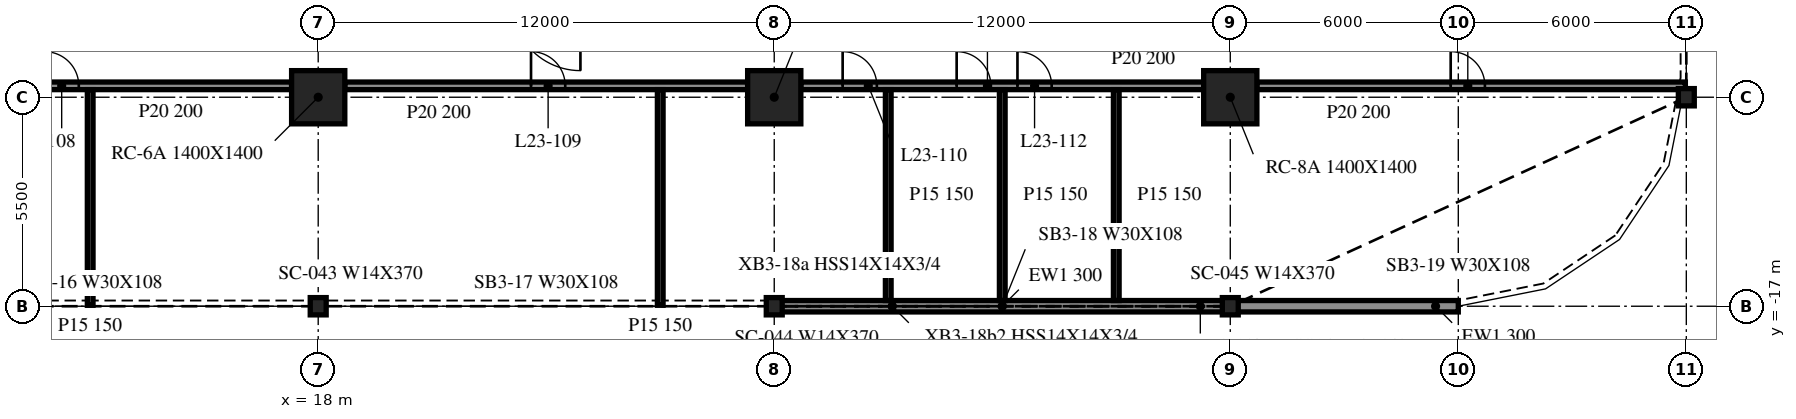
"""IFC4 building model, lengths in metres.
Left out: names, types, materials, properties, quantities, classifications, styles, units other than length and angle.
Written with IfcOpenShell. Run it as: python <this file> out.ifc"""

import sys

from ifc_helpers import new_model, si_unit, direction, frame, frame_2d, origin, origin_2d, place, context, subcontext, project, spatial, rectangle, i_section, extrude, element, fill, save


model = new_model("IFC4")
c1 = context("Model", 3, precision=1e-05, world=origin(), true_north=direction((0.0, 1.0)))
c2 = subcontext(c1, "Body", "Model", "MODEL_VIEW")
j1 = project(units=[si_unit("LENGTHUNIT", "METRE"), si_unit("PLANEANGLEUNIT", "RADIAN")], contexts=[c1])
p1 = place(None, origin())
s1 = spatial("IfcSite", under=j1, at=p1, CompositionType="ELEMENT")
p2 = place(p1, origin())
s2 = spatial("IfcBuilding", under=s1, at=p2, CompositionType="ELEMENT")
p3 = place(p2, frame((0.0, 0.0, 101.2)))
s3 = spatial("IfcBuildingStorey", under=s2, at=p3, CompositionType="ELEMENT", Elevation=101.2)
for number, where, z_axis, x_axis in (
    (1, (18.0, -11.5, -0.34), (0.0, 0.0, 1.0), (1.0, 0.0, 0.0)),
    (2, (30.0, -11.5, -0.34), (0.0, 0.0, 1.0), (1.0, 0.0, 0.0)),
    (3, (42.0, -11.5, -0.34), (0.0, 0.0, 1.0), (1.0, 0.0, 0.0)),
):
    element("IfcColumn", number, at=place(p3, frame(where, z_axis=z_axis, x_axis=x_axis)), inside=s3, PredefinedType="COLUMN", context=c2, shape_type="SweptSolid", body=[
        extrude(rectangle(XDim=1.4, YDim=1.4, at=origin_2d()), origin(), (0.0, 0.0, 1.0), 4.1),
    ])
for number, where, z_axis, x_axis in (
    (4, (18.0, -17.0, -0.34), (0.0, 0.0, 1.0), (1.0, 0.0, 0.0)),
    (5, (30.0, -17.0, -0.34), (0.0, 0.0, 1.0), (1.0, 0.0, 0.0)),
    (6, (42.0, -17.0, -0.34), (0.0, 0.0, 1.0), (1.0, 0.0, 0.0)),
    (7, (54.0, -11.5, -0.34), (0.0, 0.0, 1.0), (1.0, 0.0, 0.0)),
):
    element("IfcColumn", number, at=place(p3, frame(where, z_axis=z_axis, x_axis=x_axis)), inside=s3, PredefinedType="COLUMN", context=c2, shape_type="SweptSolid", body=[
        extrude(i_section(OverallWidth=0.419, OverallDepth=0.455, WebThickness=0.042, FlangeThickness=0.068, at=origin_2d()), origin(), (0.0, 0.0, 1.0), 4.1),
    ])
p4 = place(p3, frame((30.021, -17.0, 0.0), z_axis=(0.0, 0.0, 1.0), x_axis=(1.0, 0.0, 0.0)))
e8 = element("IfcWall", 8, at=p4, inside=s3, PredefinedType="NOTDEFINED", context=c2, shape_type="SweptSolid", body=[
    extrude(rectangle(XDim=11.958, YDim=0.3, at=frame_2d((5.979, 0.0))), origin(), (0.0, 0.0, 1.0), 3.003),
])
p5 = place(p3, frame((42.021, -17.0, 0.0), z_axis=(0.0, 0.0, 1.0), x_axis=(1.0, 0.0, 0.0)))
e9 = element("IfcWall", 9, at=p5, inside=s3, PredefinedType="NOTDEFINED", context=c2, shape_type="SweptSolid", body=[
    extrude(rectangle(XDim=5.979, YDim=0.3, at=frame_2d((2.99, 0.0))), origin(), (0.0, 0.0, 1.0), 3.003),
])
p6 = place(p3, frame((6.7, -11.2, 0.0), z_axis=(0.0, 0.0, 1.0), x_axis=(1.0, 0.0, 0.0)))
e10 = element("IfcWall", 10, at=p6, inside=s3, PredefinedType="PARTITIONING", context=c2, shape_type="SweptSolid", body=[
    extrude(rectangle(XDim=10.6, YDim=0.2, at=frame_2d((5.3, 0.0))), origin(), (0.0, 0.0, 1.0), 3.76),
])
p7 = place(p6, frame((1.1, 0.0, 0.0)))
e11 = element("IfcOpeningElement", 11, at=p7, cuts=e10, PredefinedType="OPENING", context=c2, shape_type="SweptSolid", body=[
    extrude(rectangle(XDim=0.9, YDim=2.1, at=frame_2d((0.45, 1.05))), frame((0.0, 0.11, 0.0), z_axis=(0.0, -1.0, 0.0), x_axis=(1.0, 0.0, 0.0)), (0.0, 0.0, 1.0), 0.22),
])
p8 = place(p6, frame((4.1, 0.0, 0.0)))
e12 = element("IfcOpeningElement", 12, at=p8, cuts=e10, PredefinedType="OPENING", context=c2, shape_type="SweptSolid", body=[
    extrude(rectangle(XDim=0.9, YDim=2.1, at=frame_2d((0.45, 1.05))), frame((0.0, 0.11, 0.0), z_axis=(0.0, -1.0, 0.0), x_axis=(1.0, 0.0, 0.0)), (0.0, 0.0, 1.0), 0.22),
])
p9 = place(p3, frame((18.7, -11.2, 0.0), z_axis=(0.0, 0.0, 1.0), x_axis=(1.0, 0.0, 0.0)))
e13 = element("IfcWall", 13, at=p9, inside=s3, PredefinedType="PARTITIONING", context=c2, shape_type="SweptSolid", body=[
    extrude(rectangle(XDim=10.6, YDim=0.2, at=frame_2d((5.3, 0.0))), origin(), (0.0, 0.0, 1.0), 3.76),
])
p10 = place(p9, frame((4.9, 0.0, 0.0)))
e14 = element("IfcOpeningElement", 14, at=p10, cuts=e13, PredefinedType="OPENING", context=c2, shape_type="SweptSolid", body=[
    extrude(rectangle(XDim=0.9, YDim=2.1, at=frame_2d((0.45, 1.05))), frame((0.0, 0.11, 0.0), z_axis=(0.0, -1.0, 0.0), x_axis=(1.0, 0.0, 0.0)), (0.0, 0.0, 1.0), 0.22),
])
p11 = place(p3, frame((30.7, -11.2, 0.0), z_axis=(0.0, 0.0, 1.0), x_axis=(1.0, 0.0, 0.0)))
e15 = element("IfcWall", 15, at=p11, inside=s3, PredefinedType="PARTITIONING", context=c2, shape_type="SweptSolid", body=[
    extrude(rectangle(XDim=10.6, YDim=0.2, at=frame_2d((5.3, 0.0))), origin(), (0.0, 0.0, 1.0), 3.76),
])
p12 = place(p11, frame((1.1, 0.0, 0.0)))
e16 = element("IfcOpeningElement", 16, at=p12, cuts=e15, PredefinedType="OPENING", context=c2, shape_type="SweptSolid", body=[
    extrude(rectangle(XDim=0.9, YDim=2.1, at=frame_2d((0.45, 1.05))), frame((0.0, 0.11, 0.0), z_axis=(0.0, -1.0, 0.0), x_axis=(1.0, 0.0, 0.0)), (0.0, 0.0, 1.0), 0.22),
])
p13 = place(p11, frame((4.1, 0.0, 0.0)))
e17 = element("IfcOpeningElement", 17, at=p13, cuts=e15, PredefinedType="OPENING", context=c2, shape_type="SweptSolid", body=[
    extrude(rectangle(XDim=0.9, YDim=2.1, at=frame_2d((0.45, 1.05))), frame((0.0, 0.11, 0.0), z_axis=(0.0, -1.0, 0.0), x_axis=(1.0, 0.0, 0.0)), (0.0, 0.0, 1.0), 0.22),
])
p14 = place(p11, frame((5.7, 0.0, 0.0)))
e18 = element("IfcOpeningElement", 18, at=p14, cuts=e15, PredefinedType="OPENING", context=c2, shape_type="SweptSolid", body=[
    extrude(rectangle(XDim=0.9, YDim=2.1, at=frame_2d((0.45, 1.05))), frame((0.0, 0.11, 0.0), z_axis=(0.0, -1.0, 0.0), x_axis=(1.0, 0.0, 0.0)), (0.0, 0.0, 1.0), 0.22),
])
p15 = place(p3, frame((42.7, -11.2, 0.0), z_axis=(0.0, 0.0, 1.0), x_axis=(1.0, 0.0, 0.0)))
e19 = element("IfcWall", 19, at=p15, inside=s3, PredefinedType="PARTITIONING", context=c2, shape_type="SweptSolid", body=[
    extrude(rectangle(XDim=11.275, YDim=0.2, at=frame_2d((5.638, 0.0))), origin(), (0.0, 0.0, 1.0), 3.76),
])
p16 = place(p15, frame((5.1, 0.0, 0.0)))
e20 = element("IfcOpeningElement", 20, at=p16, cuts=e19, PredefinedType="OPENING", context=c2, shape_type="SweptSolid", body=[
    extrude(rectangle(XDim=0.9, YDim=2.1, at=frame_2d((0.45, 1.05))), frame((0.0, 0.11, 0.0), z_axis=(0.0, -1.0, 0.0), x_axis=(1.0, 0.0, 0.0)), (0.0, 0.0, 1.0), 0.22),
])
for number, where, z_axis, x_axis in (
    (21, (12.0, -16.975, 0.0), (0.0, 0.0, 1.0), (0.0, 1.0, 0.0)),
    (22, (27.0, -16.975, 0.0), (0.0, 0.0, 1.0), (0.0, 1.0, 0.0)),
):
    element("IfcWall", number, at=place(p3, frame(where, z_axis=z_axis, x_axis=x_axis)), inside=s3, PredefinedType="PARTITIONING", context=c2, shape_type="SweptSolid", body=[
        extrude(rectangle(XDim=5.675, YDim=0.15, at=frame_2d((2.837, 0.0))), origin(), (0.0, 0.0, 1.0), 3.76),
    ])
for number, where, z_axis, x_axis in (
    (23, (33.0, -16.85, 0.0), (0.0, 0.0, 1.0), (0.0, 1.0, 0.0)),
    (24, (36.0, -16.85, 0.0), (0.0, 0.0, 1.0), (0.0, 1.0, 0.0)),
    (25, (39.0, -16.85, 0.0), (0.0, 0.0, 1.0), (0.0, 1.0, 0.0)),
):
    element("IfcWall", number, at=place(p3, frame(where, z_axis=z_axis, x_axis=x_axis)), inside=s3, PredefinedType="PARTITIONING", context=c2, shape_type="SweptSolid", body=[
        extrude(rectangle(XDim=5.55, YDim=0.15, at=frame_2d((2.775, 0.0))), origin(), (0.0, 0.0, 1.0), 3.76),
    ])
p17 = place(p8, origin())
e26 = element("IfcDoor", 26, at=p17, inside=s3, OperationType="SINGLE_SWING_RIGHT", PredefinedType="DOOR", context=c2, shape_type="SweptSolid", body=[
    extrude(rectangle(XDim=0.9, YDim=2.1, at=frame_2d((0.45, 1.05))), frame((0.0, 0.025, 0.0), z_axis=(0.0, -1.0, 0.0), x_axis=(1.0, 0.0, 0.0)), (0.0, 0.0, 1.0), 0.05),
])
fill(e12, e26)
p18 = place(p10, origin())
e27 = element("IfcDoor", 27, at=p18, inside=s3, OperationType="SINGLE_SWING_LEFT", PredefinedType="DOOR", context=c2, shape_type="SweptSolid", body=[
    extrude(rectangle(XDim=0.9, YDim=2.1, at=frame_2d((0.45, 1.05))), frame((0.0, 0.025, 0.0), z_axis=(0.0, -1.0, 0.0), x_axis=(1.0, 0.0, 0.0)), (0.0, 0.0, 1.0), 0.05),
])
fill(e14, e27)
p19 = place(p12, origin())
e28 = element("IfcDoor", 28, at=p19, inside=s3, OperationType="SINGLE_SWING_RIGHT", PredefinedType="DOOR", context=c2, shape_type="SweptSolid", body=[
    extrude(rectangle(XDim=0.9, YDim=2.1, at=frame_2d((0.45, 1.05))), frame((0.0, 0.025, 0.0), z_axis=(0.0, -1.0, 0.0), x_axis=(1.0, 0.0, 0.0)), (0.0, 0.0, 1.0), 0.05),
])
fill(e16, e28)
p20 = place(p13, origin())
e29 = element("IfcDoor", 29, at=p20, inside=s3, OperationType="SINGLE_SWING_RIGHT", PredefinedType="DOOR", context=c2, shape_type="SweptSolid", body=[
    extrude(rectangle(XDim=0.9, YDim=2.1, at=frame_2d((0.45, 1.05))), frame((0.0, 0.025, 0.0), z_axis=(0.0, -1.0, 0.0), x_axis=(1.0, 0.0, 0.0)), (0.0, 0.0, 1.0), 0.05),
])
fill(e17, e29)
p21 = place(p14, origin())
e30 = element("IfcDoor", 30, at=p21, inside=s3, OperationType="SINGLE_SWING_LEFT", PredefinedType="DOOR", context=c2, shape_type="SweptSolid", body=[
    extrude(rectangle(XDim=0.9, YDim=2.1, at=frame_2d((0.45, 1.05))), frame((0.0, 0.025, 0.0), z_axis=(0.0, -1.0, 0.0), x_axis=(1.0, 0.0, 0.0)), (0.0, 0.0, 1.0), 0.05),
])
fill(e18, e30)
p22 = place(p16, origin())
e31 = element("IfcDoor", 31, at=p22, inside=s3, OperationType="SINGLE_SWING_RIGHT", PredefinedType="DOOR", context=c2, shape_type="SweptSolid", body=[
    extrude(rectangle(XDim=0.9, YDim=2.1, at=frame_2d((0.45, 1.05))), frame((0.0, 0.025, 0.0), z_axis=(0.0, -1.0, 0.0), x_axis=(1.0, 0.0, 0.0)), (0.0, 0.0, 1.0), 0.05),
])
fill(e20, e31)
save(model, sys.argv[1])
